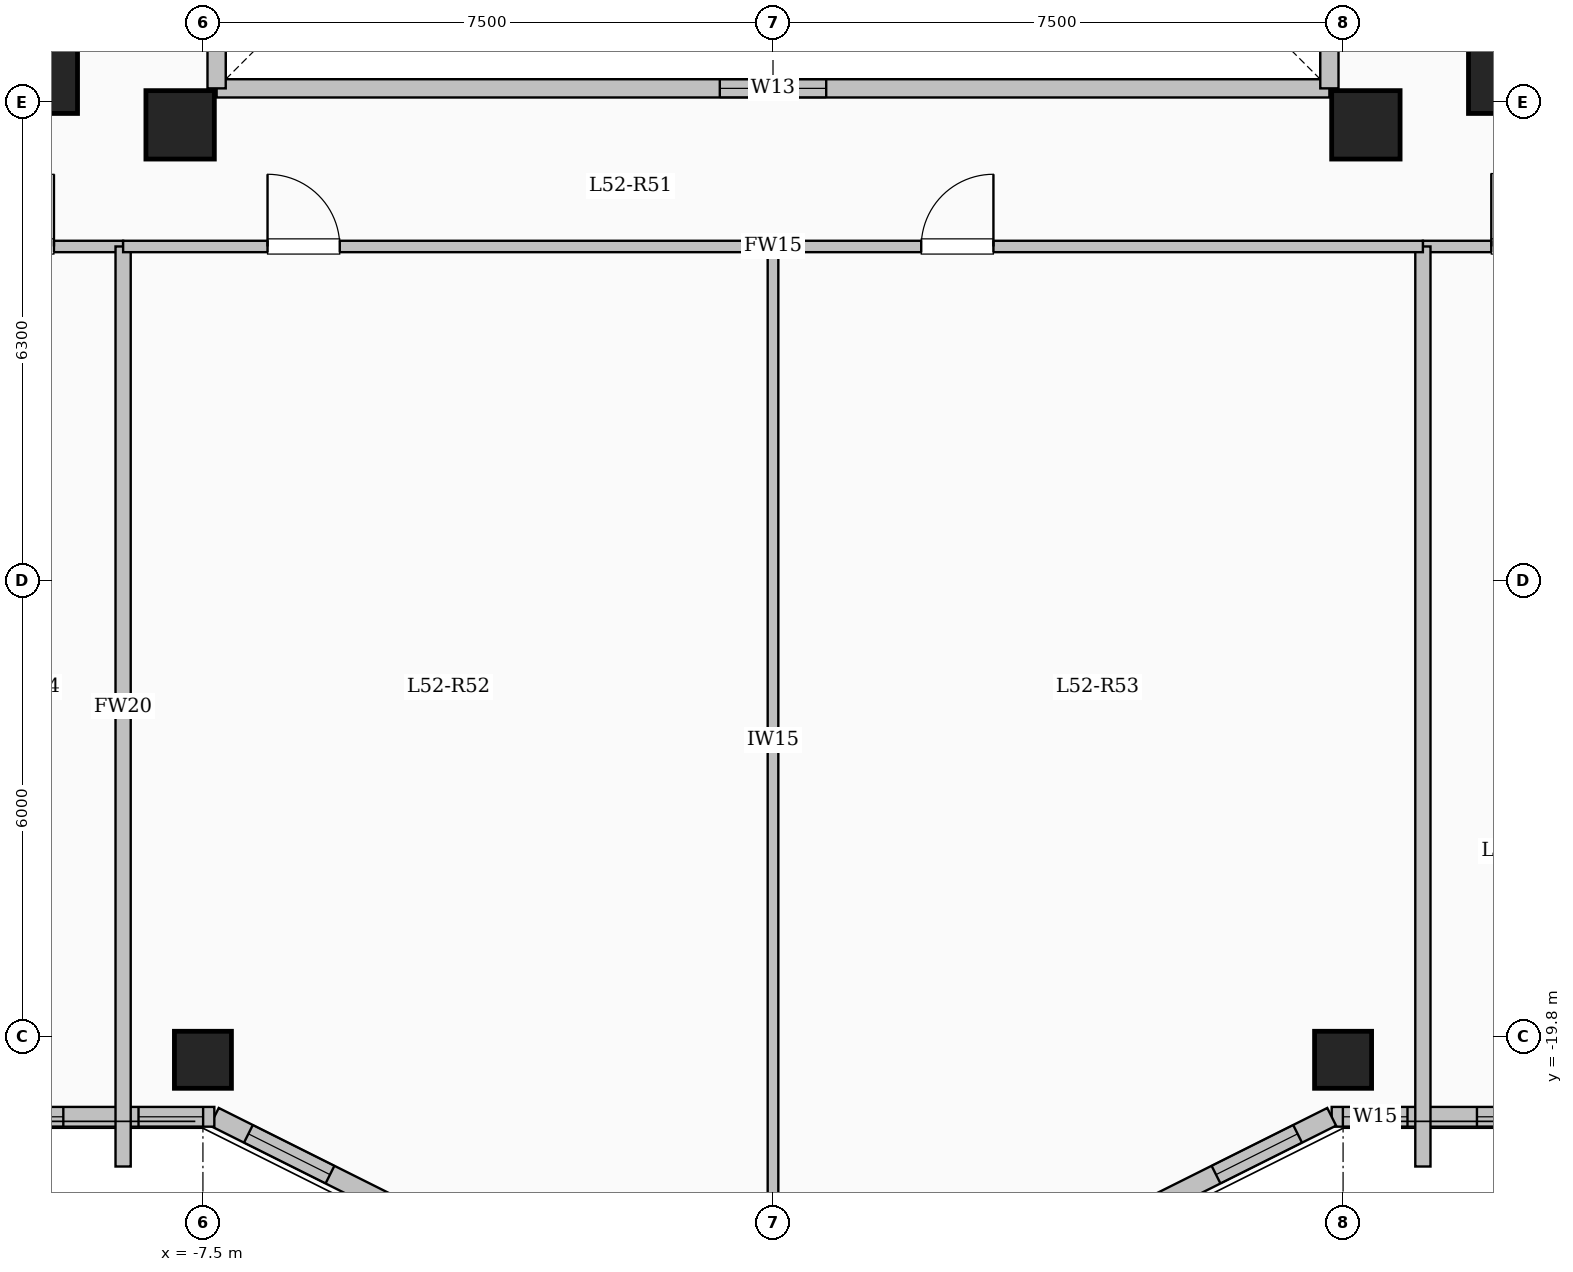
"""IFC4 building model, lengths in metres.
Left out: names, types, materials, properties, quantities, classifications, styles, units other than length and angle.
Written with IfcOpenShell. Run it as: python <this file> out.ifc"""

import sys

from ifc_helpers import new_model, si_unit, direction, frame, frame_2d, origin, origin_2d, place, context, subcontext, project, spatial, rectangle, extrude, element, fill, save


model = new_model("IFC4")
c1 = context("Model", 3, precision=1e-05, world=origin(), true_north=direction((0.0, 1.0)))
c2 = subcontext(c1, "Body", "Model", "MODEL_VIEW")
j1 = project(units=[si_unit("LENGTHUNIT", "METRE"), si_unit("PLANEANGLEUNIT", "RADIAN")], contexts=[c1])
p1 = place(None, origin())
s1 = spatial("IfcSite", under=j1, at=p1, CompositionType="ELEMENT")
p2 = place(p1, origin())
s2 = spatial("IfcBuilding", under=s1, at=p2, CompositionType="ELEMENT")
p3 = place(p2, frame((0.0, 0.0, 193.6)))
s3 = spatial("IfcBuildingStorey", under=s2, at=p3, CompositionType="ELEMENT", Elevation=193.6)
for number, where, z_axis, x_axis in (
    (1, (-7.8, -7.8, 0.0), (0.0, 0.0, 1.0), (1.0, 0.0, 0.0)),
    (2, (7.8, -7.8, 0.0), (0.0, 0.0, 1.0), (1.0, 0.0, 0.0)),
    (3, (-9.6, -7.2, 0.0), (0.0, 0.0, 1.0), (1.0, 0.0, 0.0)),
    (4, (9.6, -7.2, 0.0), (0.0, 0.0, 1.0), (1.0, 0.0, 0.0)),
):
    element("IfcColumn", number, at=place(p3, frame(where, z_axis=z_axis, x_axis=x_axis)), inside=s3, PredefinedType="COLUMN", context=c2, shape_type="SweptSolid", body=[
        extrude(rectangle(XDim=0.9, YDim=0.9, at=origin_2d()), origin(), (0.0, 0.0, 1.0), 3.35),
    ])
for number, where, z_axis, x_axis in (
    (5, (-7.5, -20.1, 0.0), (0.0, 0.0, 1.0), (1.0, 0.0, 0.0)),
    (6, (7.5, -20.1, 0.0), (0.0, 0.0, 1.0), (1.0, 0.0, 0.0)),
):
    element("IfcColumn", number, at=place(p3, frame(where, z_axis=z_axis, x_axis=x_axis)), inside=s3, PredefinedType="COLUMN", context=c2, shape_type="SweptSolid", body=[
        extrude(rectangle(XDim=0.75, YDim=0.75, at=origin_2d()), origin(), (0.0, 0.0, 1.0), 3.35),
    ])
p4 = place(p3, frame((-7.32, -7.32, 0.0), z_axis=(0.0, 0.0, 1.0), x_axis=(1.0, 0.0, 0.0)))
e7 = element("IfcWall", 7, at=p4, inside=s3, PredefinedType="SOLIDWALL", context=c2, shape_type="SweptSolid", body=[
    extrude(rectangle(XDim=14.64, YDim=0.24, at=frame_2d((7.32, 0.0))), origin(), (0.0, 0.0, 1.0), 3.1),
])
p5 = place(p4, frame((6.62, 0.0, 0.95)))
e8 = element("IfcOpeningElement", 8, at=p5, cuts=e7, PredefinedType="OPENING", context=c2, shape_type="SweptSolid", body=[
    extrude(rectangle(XDim=1.4, YDim=1.5, at=frame_2d((0.7, 0.75))), frame((0.0, 0.13, 0.0), z_axis=(0.0, -1.0, 0.0), x_axis=(1.0, 0.0, 0.0)), (0.0, 0.0, 1.0), 0.26),
])
p6 = place(p3, frame((7.32, -7.32, 0.0), z_axis=(0.0, 0.0, 1.0), x_axis=(0.0, 1.0, 0.0)))
e9 = element("IfcWall", 9, at=p6, inside=s3, PredefinedType="SOLIDWALL", context=c2, shape_type="SweptSolid", body=[
    extrude(rectangle(XDim=14.64, YDim=0.24, at=frame_2d((7.32, 0.0))), origin(), (0.0, 0.0, 1.0), 3.1),
])
p7 = place(p6, frame((6.62, 0.0, 0.95)))
e10 = element("IfcOpeningElement", 10, at=p7, cuts=e9, PredefinedType="OPENING", context=c2, shape_type="SweptSolid", body=[
    extrude(rectangle(XDim=1.4, YDim=1.5, at=frame_2d((0.7, 0.75))), frame((0.0, 0.13, 0.0), z_axis=(0.0, -1.0, 0.0), x_axis=(1.0, 0.0, 0.0)), (0.0, 0.0, 1.0), 0.26),
])
p8 = place(p3, frame((-7.32, 7.32, 0.0), z_axis=(0.0, 0.0, 1.0), x_axis=(0.0, -1.0, 0.0)))
e11 = element("IfcWall", 11, at=p8, inside=s3, PredefinedType="SOLIDWALL", context=c2, shape_type="SweptSolid", body=[
    extrude(rectangle(XDim=14.64, YDim=0.24, at=frame_2d((7.32, 0.0))), origin(), (0.0, 0.0, 1.0), 3.1),
])
p9 = place(p8, frame((6.62, 0.0, 0.95)))
e12 = element("IfcOpeningElement", 12, at=p9, cuts=e11, PredefinedType="OPENING", context=c2, shape_type="SweptSolid", body=[
    extrude(rectangle(XDim=1.4, YDim=1.5, at=frame_2d((0.7, 0.75))), frame((0.0, 0.13, 0.0), z_axis=(0.0, -1.0, 0.0), x_axis=(1.0, 0.0, 0.0)), (0.0, 0.0, 1.0), 0.26),
])
p10 = place(p3, frame((18.45, -20.85, 0.0), z_axis=(0.0, 0.0, 1.0), x_axis=(-1.0, 0.0, 0.0)))
e13 = element("IfcWall", 13, at=p10, inside=s3, PredefinedType="SOLIDWALL", context=c2, shape_type="SweptSolid", body=[
    extrude(rectangle(XDim=11.1, YDim=0.26, at=frame_2d((5.55, 0.0))), origin(), (0.0, 0.0, 1.0), 3.1),
])
p11 = place(p10, frame((0.656, 0.0, 0.95)))
e14 = element("IfcOpeningElement", 14, at=p11, cuts=e13, PredefinedType="OPENING", context=c2, shape_type="SweptSolid", body=[
    extrude(rectangle(XDim=1.2, YDim=1.5, at=frame_2d((0.6, 0.75))), frame((0.0, 0.14, 0.0), z_axis=(0.0, -1.0, 0.0), x_axis=(1.0, 0.0, 0.0)), (0.0, 0.0, 1.0), 0.28),
])
p12 = place(p10, frame((3.117, 0.0, 0.95)))
e15 = element("IfcOpeningElement", 15, at=p12, cuts=e13, PredefinedType="OPENING", context=c2, shape_type="SweptSolid", body=[
    extrude(rectangle(XDim=1.2, YDim=1.5, at=frame_2d((0.6, 0.75))), frame((0.0, 0.14, 0.0), z_axis=(0.0, -1.0, 0.0), x_axis=(1.0, 0.0, 0.0)), (0.0, 0.0, 1.0), 0.28),
])
p13 = place(p10, frame((5.566, 0.0, 0.95)))
e16 = element("IfcOpeningElement", 16, at=p13, cuts=e13, PredefinedType="OPENING", context=c2, shape_type="SweptSolid", body=[
    extrude(rectangle(XDim=1.2, YDim=1.5, at=frame_2d((0.6, 0.75))), frame((0.0, 0.14, 0.0), z_axis=(0.0, -1.0, 0.0), x_axis=(1.0, 0.0, 0.0)), (0.0, 0.0, 1.0), 0.28),
])
p14 = place(p10, frame((7.989, 0.0, 0.95)))
e17 = element("IfcOpeningElement", 17, at=p14, cuts=e13, PredefinedType="OPENING", context=c2, shape_type="SweptSolid", body=[
    extrude(rectangle(XDim=1.2, YDim=1.5, at=frame_2d((0.6, 0.75))), frame((0.0, 0.14, 0.0), z_axis=(0.0, -1.0, 0.0), x_axis=(1.0, 0.0, 0.0)), (0.0, 0.0, 1.0), 0.28),
])
p15 = place(p10, frame((10.103, 0.0, 0.95)))
e18 = element("IfcOpeningElement", 18, at=p15, cuts=e13, PredefinedType="OPENING", context=c2, shape_type="SweptSolid", body=[
    extrude(rectangle(XDim=0.85, YDim=1.5, at=frame_2d((0.425, 0.75))), frame((0.0, 0.14, 0.0), z_axis=(0.0, -1.0, 0.0), x_axis=(1.0, 0.0, 0.0)), (0.0, 0.0, 1.0), 0.28),
])
p16 = place(p3, frame((7.35, -20.85, 0.0), z_axis=(0.0, 0.0, 1.0), x_axis=(-0.894427191, -0.4472135955, 0.0)))
e19 = element("IfcWall", 19, at=p16, inside=s3, PredefinedType="SOLIDWALL", context=c2, shape_type="SweptSolid", body=[
    extrude(rectangle(XDim=3.354, YDim=0.26, at=frame_2d((1.677, 0.0))), origin(), (0.0, 0.0, 1.0), 3.1),
])
p17 = place(p16, frame((0.501, 0.0, 0.95)))
e20 = element("IfcOpeningElement", 20, at=p17, cuts=e19, PredefinedType="OPENING", context=c2, shape_type="SweptSolid", body=[
    extrude(rectangle(XDim=1.2, YDim=1.5, at=frame_2d((0.6, 0.75))), frame((0.0, 0.14, 0.0), z_axis=(0.0, -1.0, 0.0), x_axis=(1.0, 0.0, 0.0)), (0.0, 0.0, 1.0), 0.28),
])
p18 = place(p3, frame((-4.35, -22.35, 0.0), z_axis=(0.0, 0.0, 1.0), x_axis=(-0.894427191, 0.4472135955, 0.0)))
e21 = element("IfcWall", 21, at=p18, inside=s3, PredefinedType="SOLIDWALL", context=c2, shape_type="SweptSolid", body=[
    extrude(rectangle(XDim=3.354, YDim=0.26, at=frame_2d((1.677, 0.0))), origin(), (0.0, 0.0, 1.0), 3.1),
])
p19 = place(p18, frame((1.653, 0.0, 0.95)))
e22 = element("IfcOpeningElement", 22, at=p19, cuts=e21, PredefinedType="OPENING", context=c2, shape_type="SweptSolid", body=[
    extrude(rectangle(XDim=1.2, YDim=1.5, at=frame_2d((0.6, 0.75))), frame((0.0, 0.14, 0.0), z_axis=(0.0, -1.0, 0.0), x_axis=(1.0, 0.0, 0.0)), (0.0, 0.0, 1.0), 0.28),
])
p20 = place(p3, frame((-7.35, -20.85, 0.0), z_axis=(0.0, 0.0, 1.0), x_axis=(-1.0, 0.0, 0.0)))
e23 = element("IfcWall", 23, at=p20, inside=s3, PredefinedType="SOLIDWALL", context=c2, shape_type="SweptSolid", body=[
    extrude(rectangle(XDim=11.1, YDim=0.26, at=frame_2d((5.55, 0.0))), origin(), (0.0, 0.0, 1.0), 3.1),
])
p21 = place(p20, frame((0.147, 0.0, 0.95)))
e24 = element("IfcOpeningElement", 24, at=p21, cuts=e23, PredefinedType="OPENING", context=c2, shape_type="SweptSolid", body=[
    extrude(rectangle(XDim=0.85, YDim=1.5, at=frame_2d((0.425, 0.75))), frame((0.0, 0.14, 0.0), z_axis=(0.0, -1.0, 0.0), x_axis=(1.0, 0.0, 0.0)), (0.0, 0.0, 1.0), 0.28),
])
p22 = place(p20, frame((1.987, 0.0, 0.95)))
e25 = element("IfcOpeningElement", 25, at=p22, cuts=e23, PredefinedType="OPENING", context=c2, shape_type="SweptSolid", body=[
    extrude(rectangle(XDim=1.2, YDim=1.5, at=frame_2d((0.6, 0.75))), frame((0.0, 0.14, 0.0), z_axis=(0.0, -1.0, 0.0), x_axis=(1.0, 0.0, 0.0)), (0.0, 0.0, 1.0), 0.28),
])
p23 = place(p20, frame((4.926, 0.0, 0.9)))
e26 = element("IfcOpeningElement", 26, at=p23, cuts=e23, PredefinedType="OPENING", context=c2, shape_type="SweptSolid", body=[
    extrude(rectangle(XDim=1.65, YDim=1.6, at=frame_2d((0.825, 0.8))), frame((0.0, 0.14, 0.0), z_axis=(0.0, -1.0, 0.0), x_axis=(1.0, 0.0, 0.0)), (0.0, 0.0, 1.0), 0.28),
])
p24 = place(p20, frame((8.467, 0.0, 0.9)))
e27 = element("IfcOpeningElement", 27, at=p24, cuts=e23, PredefinedType="OPENING", context=c2, shape_type="SweptSolid", body=[
    extrude(rectangle(XDim=1.65, YDim=1.6, at=frame_2d((0.825, 0.8))), frame((0.0, 0.14, 0.0), z_axis=(0.0, -1.0, 0.0), x_axis=(1.0, 0.0, 0.0)), (0.0, 0.0, 1.0), 0.28),
])
p25 = place(p3, frame((-18.35, -9.4, 0.0), z_axis=(0.0, 0.0, 1.0), x_axis=(1.0, 0.0, 0.0)))
e28 = element("IfcWall", 28, at=p25, inside=s3, PredefinedType="PARTITIONING", context=c2, shape_type="SweptSolid", body=[
    extrude(rectangle(XDim=9.8, YDim=0.15, at=frame_2d((4.9, 0.0))), origin(), (0.0, 0.0, 1.0), 3.1),
])
p26 = place(p25, frame((1.25, 0.0, 0.0)))
e29 = element("IfcOpeningElement", 29, at=p26, cuts=e28, PredefinedType="OPENING", context=c2, shape_type="SweptSolid", body=[
    extrude(rectangle(XDim=0.95, YDim=2.15, at=frame_2d((0.475, 1.075))), frame((0.0, 0.085, 0.0), z_axis=(0.0, -1.0, 0.0), x_axis=(1.0, 0.0, 0.0)), (0.0, 0.0, 1.0), 0.17),
])
p27 = place(p25, frame((4.79, 0.0, 0.0)))
e30 = element("IfcOpeningElement", 30, at=p27, cuts=e28, PredefinedType="OPENING", context=c2, shape_type="SweptSolid", body=[
    extrude(rectangle(XDim=0.95, YDim=2.15, at=frame_2d((0.475, 1.075))), frame((0.0, 0.085, 0.0), z_axis=(0.0, -1.0, 0.0), x_axis=(1.0, 0.0, 0.0)), (0.0, 0.0, 1.0), 0.17),
])
p28 = place(p25, frame((7.94, 0.0, 0.0)))
e31 = element("IfcOpeningElement", 31, at=p28, cuts=e28, PredefinedType="OPENING", context=c2, shape_type="SweptSolid", body=[
    extrude(rectangle(XDim=0.95, YDim=2.15, at=frame_2d((0.475, 1.075))), frame((0.0, 0.085, 0.0), z_axis=(0.0, -1.0, 0.0), x_axis=(1.0, 0.0, 0.0)), (0.0, 0.0, 1.0), 0.17),
])
p29 = place(p3, frame((8.55, -9.4, 0.0), z_axis=(0.0, 0.0, 1.0), x_axis=(1.0, 0.0, 0.0)))
e32 = element("IfcWall", 32, at=p29, inside=s3, PredefinedType="PARTITIONING", context=c2, shape_type="SweptSolid", body=[
    extrude(rectangle(XDim=9.8, YDim=0.15, at=frame_2d((4.9, 0.0))), origin(), (0.0, 0.0, 1.0), 3.1),
])
p30 = place(p29, frame((0.9, 0.0, 0.0)))
e33 = element("IfcOpeningElement", 33, at=p30, cuts=e32, PredefinedType="OPENING", context=c2, shape_type="SweptSolid", body=[
    extrude(rectangle(XDim=0.96, YDim=2.15, at=frame_2d((0.48, 1.075))), frame((0.0, 0.085, 0.0), z_axis=(0.0, -1.0, 0.0), x_axis=(1.0, 0.0, 0.0)), (0.0, 0.0, 1.0), 0.17),
])
p31 = place(p29, frame((5.625, 0.0, 0.0)))
e34 = element("IfcOpeningElement", 34, at=p31, cuts=e32, PredefinedType="OPENING", context=c2, shape_type="SweptSolid", body=[
    extrude(rectangle(XDim=0.96, YDim=2.15, at=frame_2d((0.48, 1.075))), frame((0.0, 0.085, 0.0), z_axis=(0.0, -1.0, 0.0), x_axis=(1.0, 0.0, 0.0)), (0.0, 0.0, 1.0), 0.17),
])
for number, where, z_axis, x_axis in (
    (35, (-8.55, -21.504, 0.0), (0.0, 0.0, 1.0), (0.0, 1.0, 0.0)),
    (36, (8.55, -21.504, 0.0), (0.0, 0.0, 1.0), (0.0, 1.0, 0.0)),
):
    element("IfcWall", number, at=place(p3, frame(where, z_axis=z_axis, x_axis=x_axis)), inside=s3, PredefinedType="SOLIDWALL", context=c2, shape_type="SweptSolid", body=[
        extrude(rectangle(XDim=12.104, YDim=0.2, at=frame_2d((6.052, 0.0))), origin(), (0.0, 0.0, 1.0), 3.1),
    ])
p32 = place(p3, frame((-8.55, -9.4, 0.0), z_axis=(0.0, 0.0, 1.0), x_axis=(1.0, 0.0, 0.0)))
e37 = element("IfcWall", 37, at=p32, inside=s3, PredefinedType="PARTITIONING", context=c2, shape_type="SweptSolid", body=[
    extrude(rectangle(XDim=17.1, YDim=0.15, at=frame_2d((8.55, 0.0))), origin(), (0.0, 0.0, 1.0), 3.1),
])
p33 = place(p32, frame((1.9, 0.0, 0.0)))
e38 = element("IfcOpeningElement", 38, at=p33, cuts=e37, PredefinedType="OPENING", context=c2, shape_type="SweptSolid", body=[
    extrude(rectangle(XDim=0.95, YDim=2.15, at=frame_2d((0.475, 1.075))), frame((0.0, 0.085, 0.0), z_axis=(0.0, -1.0, 0.0), x_axis=(1.0, 0.0, 0.0)), (0.0, 0.0, 1.0), 0.17),
])
p34 = place(p32, frame((10.5, 0.0, 0.0)))
e39 = element("IfcOpeningElement", 39, at=p34, cuts=e37, PredefinedType="OPENING", context=c2, shape_type="SweptSolid", body=[
    extrude(rectangle(XDim=0.95, YDim=2.15, at=frame_2d((0.475, 1.075))), frame((0.0, 0.085, 0.0), z_axis=(0.0, -1.0, 0.0), x_axis=(1.0, 0.0, 0.0)), (0.0, 0.0, 1.0), 0.17),
])
p35 = place(p3, frame((0.0, -22.38, 0.0), z_axis=(0.0, 0.0, 1.0), x_axis=(0.0, 1.0, 0.0)))
e40 = element("IfcWall", 40, at=p35, inside=s3, PredefinedType="PARTITIONING", context=c2, shape_type="SweptSolid", body=[
    extrude(rectangle(XDim=12.98, YDim=0.14, at=frame_2d((6.49, 0.0))), origin(), (0.0, 0.0, 1.0), 3.1),
])
p36 = place(p5, origin())
e41 = element("IfcWindow", 41, at=p36, inside=s3, PartitioningType="SINGLE_PANEL", PredefinedType="WINDOW", context=c2, shape_type="SweptSolid", body=[
    extrude(rectangle(XDim=1.4, YDim=1.5, at=frame_2d((0.7, 0.75))), frame((0.0, 0.03, 0.0), z_axis=(0.0, -1.0, 0.0), x_axis=(1.0, 0.0, 0.0)), (0.0, 0.0, 1.0), 0.06),
])
fill(e8, e41)
p37 = place(p14, origin())
e42 = element("IfcWindow", 42, at=p37, inside=s3, PartitioningType="SINGLE_PANEL", PredefinedType="WINDOW", context=c2, shape_type="SweptSolid", body=[
    extrude(rectangle(XDim=1.2, YDim=1.5, at=frame_2d((0.6, 0.75))), frame((0.0, 0.03, 0.0), z_axis=(0.0, -1.0, 0.0), x_axis=(1.0, 0.0, 0.0)), (0.0, 0.0, 1.0), 0.06),
])
fill(e17, e42)
p38 = place(p15, origin())
e43 = element("IfcWindow", 43, at=p38, inside=s3, PartitioningType="SINGLE_PANEL", PredefinedType="WINDOW", context=c2, shape_type="SweptSolid", body=[
    extrude(rectangle(XDim=0.85, YDim=1.5, at=frame_2d((0.425, 0.75))), frame((0.0, 0.03, 0.0), z_axis=(0.0, -1.0, 0.0), x_axis=(1.0, 0.0, 0.0)), (0.0, 0.0, 1.0), 0.06),
])
fill(e18, e43)
p39 = place(p17, origin())
e44 = element("IfcWindow", 44, at=p39, inside=s3, PartitioningType="SINGLE_PANEL", PredefinedType="WINDOW", context=c2, shape_type="SweptSolid", body=[
    extrude(rectangle(XDim=1.2, YDim=1.5, at=frame_2d((0.6, 0.75))), frame((0.0, 0.03, 0.0), z_axis=(0.0, -1.0, 0.0), x_axis=(1.0, 0.0, 0.0)), (0.0, 0.0, 1.0), 0.06),
])
fill(e20, e44)
p40 = place(p19, origin())
e45 = element("IfcWindow", 45, at=p40, inside=s3, PartitioningType="SINGLE_PANEL", PredefinedType="WINDOW", context=c2, shape_type="SweptSolid", body=[
    extrude(rectangle(XDim=1.2, YDim=1.5, at=frame_2d((0.6, 0.75))), frame((0.0, 0.03, 0.0), z_axis=(0.0, -1.0, 0.0), x_axis=(1.0, 0.0, 0.0)), (0.0, 0.0, 1.0), 0.06),
])
fill(e22, e45)
p41 = place(p21, origin())
e46 = element("IfcWindow", 46, at=p41, inside=s3, PartitioningType="SINGLE_PANEL", PredefinedType="WINDOW", context=c2, shape_type="SweptSolid", body=[
    extrude(rectangle(XDim=0.85, YDim=1.5, at=frame_2d((0.425, 0.75))), frame((0.0, 0.03, 0.0), z_axis=(0.0, -1.0, 0.0), x_axis=(1.0, 0.0, 0.0)), (0.0, 0.0, 1.0), 0.06),
])
fill(e24, e46)
p42 = place(p22, origin())
e47 = element("IfcWindow", 47, at=p42, inside=s3, PartitioningType="SINGLE_PANEL", PredefinedType="WINDOW", context=c2, shape_type="SweptSolid", body=[
    extrude(rectangle(XDim=1.2, YDim=1.5, at=frame_2d((0.6, 0.75))), frame((0.0, 0.03, 0.0), z_axis=(0.0, -1.0, 0.0), x_axis=(1.0, 0.0, 0.0)), (0.0, 0.0, 1.0), 0.06),
])
fill(e25, e47)
p43 = place(p28, origin())
e48 = element("IfcDoor", 48, at=p43, inside=s3, OperationType="SINGLE_SWING_RIGHT", PredefinedType="DOOR", context=c2, shape_type="SweptSolid", body=[
    extrude(rectangle(XDim=0.95, YDim=2.15, at=frame_2d((0.475, 1.075))), frame((0.0, 0.025, 0.0), z_axis=(0.0, -1.0, 0.0), x_axis=(1.0, 0.0, 0.0)), (0.0, 0.0, 1.0), 0.05),
])
fill(e31, e48)
p44 = place(p30, origin())
e49 = element("IfcDoor", 49, at=p44, inside=s3, OperationType="SINGLE_SWING_LEFT", PredefinedType="DOOR", context=c2, shape_type="SweptSolid", body=[
    extrude(rectangle(XDim=0.96, YDim=2.15, at=frame_2d((0.48, 1.075))), frame((0.0, 0.025, 0.0), z_axis=(0.0, -1.0, 0.0), x_axis=(1.0, 0.0, 0.0)), (0.0, 0.0, 1.0), 0.05),
])
fill(e33, e49)
p45 = place(p33, origin())
e50 = element("IfcDoor", 50, at=p45, inside=s3, OperationType="SINGLE_SWING_LEFT", PredefinedType="DOOR", context=c2, shape_type="SweptSolid", body=[
    extrude(rectangle(XDim=0.95, YDim=2.15, at=frame_2d((0.475, 1.075))), frame((0.0, 0.025, 0.0), z_axis=(0.0, -1.0, 0.0), x_axis=(1.0, 0.0, 0.0)), (0.0, 0.0, 1.0), 0.05),
])
fill(e38, e50)
p46 = place(p34, origin())
e51 = element("IfcDoor", 51, at=p46, inside=s3, OperationType="SINGLE_SWING_RIGHT", PredefinedType="DOOR", context=c2, shape_type="SweptSolid", body=[
    extrude(rectangle(XDim=0.95, YDim=2.15, at=frame_2d((0.475, 1.075))), frame((0.0, 0.025, 0.0), z_axis=(0.0, -1.0, 0.0), x_axis=(1.0, 0.0, 0.0)), (0.0, 0.0, 1.0), 0.05),
])
fill(e39, e51)
save(model, sys.argv[1])
